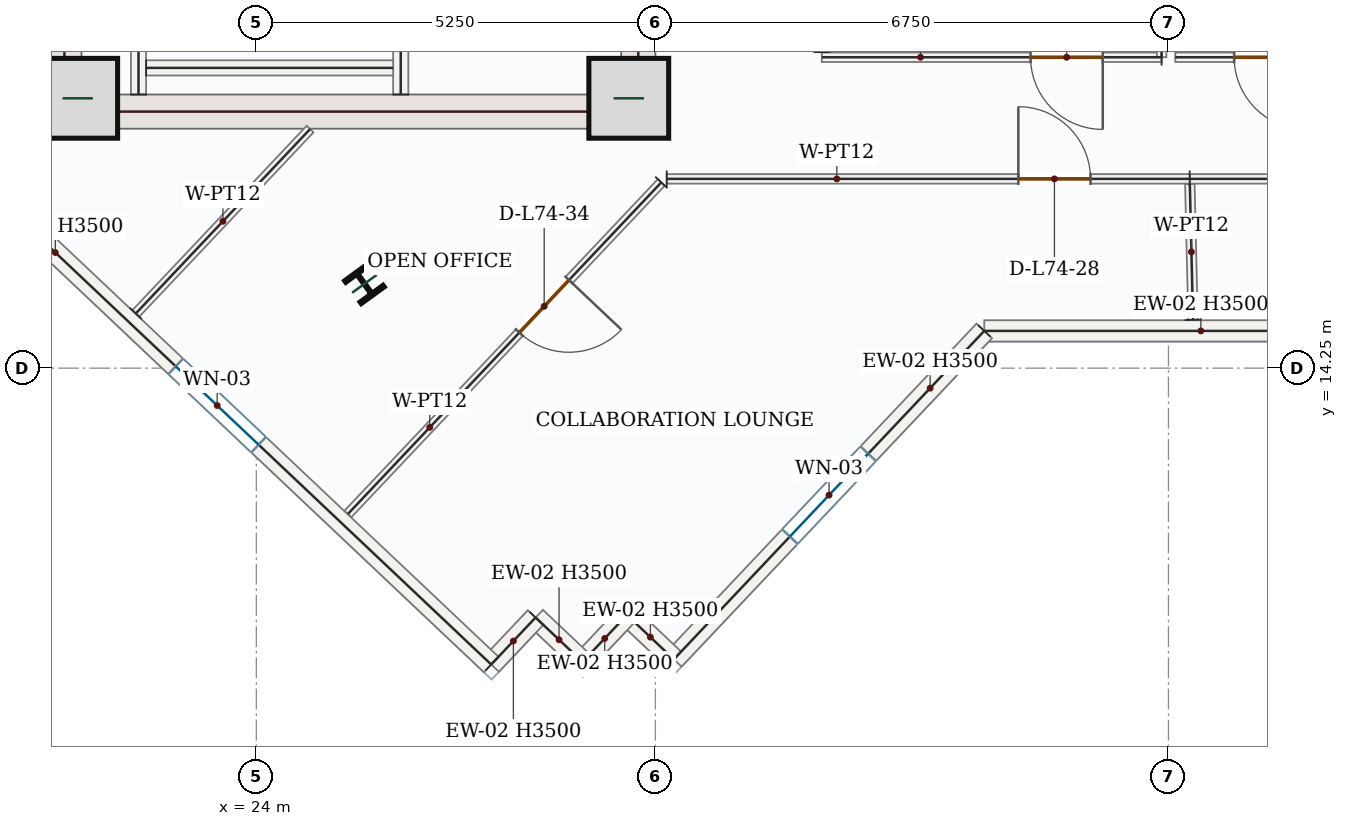
"""IFC4 building model, lengths in metres.
Left out: names, types, materials, properties, quantities, classifications, styles, units other than length and angle.
Written with IfcOpenShell. Run it as: python <this file> out.ifc"""

import sys

from ifc_helpers import new_model, si_unit, direction, frame, frame_2d, origin, origin_2d, place, context, subcontext, project, spatial, rectangle, i_section, extrude, source, transform, mapped, element, fill, save


model = new_model("IFC4")
c1 = context("Model", 3, precision=1e-05, world=origin(), true_north=direction((0.0, 1.0)))
c2 = subcontext(c1, "Body", "Model", "MODEL_VIEW")
j1 = project(units=[si_unit("LENGTHUNIT", "METRE"), si_unit("PLANEANGLEUNIT", "RADIAN")], contexts=[c1])
p1 = place(None, origin())
s1 = spatial("IfcSite", under=j1, at=p1, CompositionType="ELEMENT")
p2 = place(p1, origin())
s2 = spatial("IfcBuilding", under=s1, at=p2, CompositionType="ELEMENT")
p3 = place(p2, frame((0.0, 0.0, 306.6)))
s3 = spatial("IfcBuildingStorey", under=s2, at=p3, CompositionType="ELEMENT", Elevation=306.6)
m1 = source(origin(), c2, "Body", "SweptSolid", [
    extrude(rectangle(XDim=8.55, YDim=0.45, at=frame_2d((4.275, 0.0))), origin(), (0.0, 0.0, 1.0), 3.5),
])
p4 = place(p3, frame((21.475, 17.4, 0.0), z_axis=(0.0, 0.0, 1.0), x_axis=(0.0, 1.0, 0.0)))
e1 = element("IfcWall", 1, at=p4, inside=s3, PredefinedType="SHEAR", context=c2, shape_type="MappedRepresentation", body=[
    mapped(m1, transform((0.0, 0.0, 0.0), x_axis=(1.0, 0.0, 0.0), y_axis=(0.0, 1.0, 0.0), z_axis=(0.0, 0.0, 1.0), scale=1.0)),
])
p5 = place(p3, frame((29.025, 17.4, 0.0), z_axis=(0.0, 0.0, 1.0), x_axis=(0.0, 1.0, 0.0)))
e2 = element("IfcWall", 2, at=p5, inside=s3, PredefinedType="SHEAR", context=c2, shape_type="SweptSolid", body=[
    extrude(rectangle(XDim=8.55, YDim=0.45, at=frame_2d((4.275, 0.0))), origin(), (0.0, 0.0, 1.0), 3.5),
])
p6 = place(p5, frame((6.65, 0.0, 0.0)))
e3 = element("IfcOpeningElement", 3, at=p6, cuts=e2, PredefinedType="OPENING", context=c2, shape_type="SweptSolid", body=[
    extrude(rectangle(XDim=1.1, YDim=2.2, at=frame_2d((0.55, 1.1))), frame((0.0, 0.235, 0.0), z_axis=(0.0, -1.0, 0.0), x_axis=(1.0, 0.0, 0.0)), (0.0, 0.0, 1.0), 0.47),
])
p7 = place(p5, frame((2.7, 0.0, 0.0)))
e4 = element("IfcOpeningElement", 4, at=p7, cuts=e2, PredefinedType="OPENING", context=c2, shape_type="SweptSolid", body=[
    extrude(rectangle(XDim=0.88, YDim=2.1, at=frame_2d((0.44, 1.05))), frame((0.0, 0.235, 0.0), z_axis=(0.0, -1.0, 0.0), x_axis=(1.0, 0.0, 0.0)), (0.0, 0.0, 1.0), 0.47),
])
p8 = place(p5, frame((4.6, 0.0, 0.0)))
e5 = element("IfcOpeningElement", 5, at=p8, cuts=e2, PredefinedType="OPENING", context=c2, shape_type="SweptSolid", body=[
    extrude(rectangle(XDim=0.88, YDim=2.1, at=frame_2d((0.44, 1.05))), frame((0.0, 0.235, 0.0), z_axis=(0.0, -1.0, 0.0), x_axis=(1.0, 0.0, 0.0)), (0.0, 0.0, 1.0), 0.47),
])
m2 = source(origin(), c2, "Body", "SweptSolid", [
    extrude(rectangle(XDim=7.1, YDim=0.45, at=frame_2d((3.55, 0.0))), origin(), (0.0, 0.0, 1.0), 3.5),
])
p9 = place(p3, frame((21.7, 17.625, 0.0), z_axis=(0.0, 0.0, 1.0), x_axis=(1.0, 0.0, 0.0)))
e6 = element("IfcWall", 6, at=p9, inside=s3, PredefinedType="SHEAR", context=c2, shape_type="MappedRepresentation", body=[
    mapped(m2, transform((0.0, 0.0, 0.0), x_axis=(1.0, 0.0, 0.0), y_axis=(0.0, 1.0, 0.0), z_axis=(0.0, 0.0, 1.0), scale=1.0)),
])
m3 = source(origin(), c2, "Body", "SweptSolid", [
    extrude(rectangle(XDim=1.05, YDim=1.05, at=origin_2d()), origin(), (0.0, 0.0, 1.0), 3.75),
])
for number, where, z_axis, x_axis in (
    (7, (21.65, 17.8, 0.0), (0.0, 0.0, 1.0), (1.0, 0.0, 0.0)),
    (8, (28.9, 17.8, 0.0), (0.0, 0.0, 1.0), (1.0, 0.0, 0.0)),
):
    element("IfcColumn", number, at=place(p3, frame(where, z_axis=z_axis, x_axis=x_axis)), inside=s3, PredefinedType="COLUMN", context=c2, shape_type="MappedRepresentation", body=[
        mapped(m3, transform((0.0, 0.0, 0.0), x_axis=(1.0, 0.0, 0.0), y_axis=(0.0, 1.0, 0.0), z_axis=(0.0, 0.0, 1.0), scale=1.0)),
    ])
m4 = source(origin(), c2, "Body", "SweptSolid", [
    extrude(i_section(OverallWidth=0.374, OverallDepth=0.372, WebThickness=0.016, FlangeThickness=0.026, FilletRadius=0.018, at=origin_2d()), origin(), (0.0, 0.0, 1.0), 3.75),
])
p10 = place(p3, frame((25.422, 15.359, 0.0), z_axis=(0.0, 0.0, 1.0), x_axis=(0.809016994375, 0.587785252292, 0.0)))
e9 = element("IfcColumn", 9, at=p10, inside=s3, PredefinedType="COLUMN", context=c2, shape_type="MappedRepresentation", body=[
    mapped(m4, transform((0.0, 0.0, 0.0), x_axis=(1.0, 0.0, 0.0), y_axis=(0.0, 1.0, 0.0), z_axis=(0.0, 0.0, 1.0), scale=1.0)),
])
m5 = source(origin(), c2, "Body", "SweptSolid", [
    extrude(rectangle(XDim=5.699, YDim=0.28, at=frame_2d((2.85, 0.0))), origin(), (0.0, 0.0, 1.0), 3.5),
])
p11 = place(p3, frame((39.276, 14.74, 0.0), z_axis=(0.0, 0.0, 1.0), x_axis=(-1.0, 0.0, 0.0)))
e10 = element("IfcWall", 10, at=p11, inside=s3, PredefinedType="SOLIDWALL", context=c2, shape_type="MappedRepresentation", body=[
    mapped(m5, transform((0.0, 0.0, 0.0), x_axis=(1.0, 0.0, 0.0), y_axis=(0.0, 1.0, 0.0), z_axis=(0.0, 0.0, 1.0), scale=1.0)),
])
p12 = place(p3, frame((33.577, 14.74, 0.0), z_axis=(0.0, 0.0, 1.0), x_axis=(-0.686888766374, -0.72676256276, 0.0)))
e11 = element("IfcWall", 11, at=p12, inside=s3, PredefinedType="SOLIDWALL", context=c2, shape_type="SweptSolid", body=[
    extrude(rectangle(XDim=5.945, YDim=0.28, at=frame_2d((2.973, 0.0))), origin(), (0.0, 0.0, 1.0), 3.5),
])
p13 = place(p12, frame((2.223, 0.0, 0.85)))
e12 = element("IfcOpeningElement", 12, at=p13, cuts=e11, PredefinedType="OPENING", context=c2, shape_type="SweptSolid", body=[
    extrude(rectangle(XDim=1.5, YDim=1.5, at=frame_2d((0.75, 0.75))), frame((0.0, 0.15, 0.0), z_axis=(0.0, -1.0, 0.0), x_axis=(1.0, 0.0, 0.0)), (0.0, 0.0, 1.0), 0.3),
])
m6 = source(origin(), c2, "Body", "SweptSolid", [
    extrude(rectangle(XDim=0.85, YDim=0.28, at=frame_2d((0.425, 0.0))), origin(), (0.0, 0.0, 1.0), 3.5),
])
p14 = place(p3, frame((29.493, 10.419, 0.0), z_axis=(0.0, 0.0, 1.0), x_axis=(-0.726790047388, 0.686859685101, 0.0)))
e13 = element("IfcWall", 13, at=p14, inside=s3, PredefinedType="SOLIDWALL", context=c2, shape_type="MappedRepresentation", body=[
    mapped(m6, transform((0.0, 0.0, 0.0), x_axis=(1.0, 0.0, 0.0), y_axis=(0.0, 1.0, 0.0), z_axis=(0.0, 0.0, 1.0), scale=1.0)),
])
m7 = source(origin(), c2, "Body", "SweptSolid", [
    extrude(rectangle(XDim=0.85, YDim=0.28, at=frame_2d((0.425, 0.0))), origin(), (0.0, 0.0, 1.0), 3.5),
])
p15 = place(p3, frame((28.875, 11.003, 0.0), z_axis=(0.0, 0.0, 1.0), x_axis=(-0.687011382404, -0.726646654466, 0.0)))
e14 = element("IfcWall", 14, at=p15, inside=s3, PredefinedType="SOLIDWALL", context=c2, shape_type="MappedRepresentation", body=[
    mapped(m7, transform((0.0, 0.0, 0.0), x_axis=(1.0, 0.0, 0.0), y_axis=(0.0, 1.0, 0.0), z_axis=(0.0, 0.0, 1.0), scale=1.0)),
])
p16 = place(p3, frame((28.292, 10.385, 0.0), z_axis=(0.0, 0.0, 1.0), x_axis=(-0.726790047388, 0.686859685101, 0.0)))
e15 = element("IfcWall", 15, at=p16, inside=s3, PredefinedType="SOLIDWALL", context=c2, shape_type="MappedRepresentation", body=[
    mapped(m6, transform((0.0, 0.0, 0.0), x_axis=(1.0, 0.0, 0.0), y_axis=(0.0, 1.0, 0.0), z_axis=(0.0, 0.0, 1.0), scale=1.0)),
])
p17 = place(p3, frame((27.674, 10.969, 0.0), z_axis=(0.0, 0.0, 1.0), x_axis=(-0.687011382404, -0.726646654466, 0.0)))
e16 = element("IfcWall", 16, at=p17, inside=s3, PredefinedType="SOLIDWALL", context=c2, shape_type="MappedRepresentation", body=[
    mapped(m7, transform((0.0, 0.0, 0.0), x_axis=(1.0, 0.0, 0.0), y_axis=(0.0, 1.0, 0.0), z_axis=(0.0, 0.0, 1.0), scale=1.0)),
])
p18 = place(p3, frame((27.09, 10.351, 0.0), z_axis=(0.0, 0.0, 1.0), x_axis=(-0.726772856404, 0.686877875022, 0.0)))
e17 = element("IfcWall", 17, at=p18, inside=s3, PredefinedType="SOLIDWALL", context=c2, shape_type="SweptSolid", body=[
    extrude(rectangle(XDim=9.92, YDim=0.28, at=frame_2d((4.96, 0.0))), origin(), (0.0, 0.0, 1.0), 3.5),
])
p19 = place(p18, frame((4.21, 0.0, 0.85)))
e18 = element("IfcOpeningElement", 18, at=p19, cuts=e17, PredefinedType="OPENING", context=c2, shape_type="SweptSolid", body=[
    extrude(rectangle(XDim=1.5, YDim=1.5, at=frame_2d((0.75, 0.75))), frame((0.0, 0.15, 0.0), z_axis=(0.0, -1.0, 0.0), x_axis=(1.0, 0.0, 0.0)), (0.0, 0.0, 1.0), 0.3),
])
m8 = source(origin(), c2, "Body", "SweptSolid", [
    extrude(rectangle(XDim=7.87, YDim=0.2, at=frame_2d((3.935, 0.0))), origin(), (0.0, 0.0, 1.0), 3.5),
])
p20 = place(p3, frame((22.45, 17.85, 0.0), z_axis=(0.0, 0.0, 1.0), x_axis=(0.0, 1.0, 0.0)))
e19 = element("IfcWall", 19, at=p20, inside=s3, PredefinedType="SOLIDWALL", context=c2, shape_type="MappedRepresentation", body=[
    mapped(m8, transform((0.0, 0.0, 0.0), x_axis=(1.0, 0.0, 0.0), y_axis=(0.0, 1.0, 0.0), z_axis=(0.0, 0.0, 1.0), scale=1.0)),
])
p21 = place(p3, frame((25.9, 17.85, 0.0), z_axis=(0.0, 0.0, 1.0), x_axis=(0.0, 1.0, 0.0)))
e20 = element("IfcWall", 20, at=p21, inside=s3, PredefinedType="SOLIDWALL", context=c2, shape_type="SweptSolid", body=[
    extrude(rectangle(XDim=8.0, YDim=0.2, at=frame_2d((4.0, 0.0))), origin(), (0.0, 0.0, 1.0), 3.5),
])
p22 = place(p21, frame((6.2, 0.0, 0.0)))
e21 = element("IfcOpeningElement", 21, at=p22, cuts=e20, PredefinedType="OPENING", context=c2, shape_type="SweptSolid", body=[
    extrude(rectangle(XDim=1.0, YDim=2.15, at=frame_2d((0.5, 1.075))), frame((0.0, 0.11, 0.0), z_axis=(0.0, -1.0, 0.0), x_axis=(1.0, 0.0, 0.0)), (0.0, 0.0, 1.0), 0.22),
])
p23 = place(p21, frame((0.6, 0.0, 0.0)))
e22 = element("IfcOpeningElement", 22, at=p23, cuts=e20, PredefinedType="OPENING", context=c2, shape_type="SweptSolid", body=[
    extrude(rectangle(XDim=0.88, YDim=2.1, at=frame_2d((0.44, 1.05))), frame((0.0, 0.11, 0.0), z_axis=(0.0, -1.0, 0.0), x_axis=(1.0, 0.0, 0.0)), (0.0, 0.0, 1.0), 0.22),
])
m9 = source(origin(), c2, "Body", "SweptSolid", [
    extrude(rectangle(XDim=3.25, YDim=0.2, at=frame_2d((1.625, 0.0))), origin(), (0.0, 0.0, 1.0), 3.5),
])
p24 = place(p3, frame((22.55, 18.2, 0.0), z_axis=(0.0, 0.0, 1.0), x_axis=(1.0, 0.0, 0.0)))
e23 = element("IfcWall", 23, at=p24, inside=s3, PredefinedType="SOLIDWALL", context=c2, shape_type="MappedRepresentation", body=[
    mapped(m9, transform((0.0, 0.0, 0.0), x_axis=(1.0, 0.0, 0.0), y_axis=(0.0, 1.0, 0.0), z_axis=(0.0, 0.0, 1.0), scale=1.0)),
])
p25 = place(p3, frame((35.91, 18.34, 0.0), z_axis=(0.0, 0.0, 1.0), x_axis=(-1.0, 0.0, 0.0)))
e24 = element("IfcWall", 24, at=p25, inside=s3, PredefinedType="PARTITIONING", context=c2, shape_type="SweptSolid", body=[
    extrude(rectangle(XDim=4.47, YDim=0.125, at=frame_2d((2.235, 0.0))), origin(), (0.0, 0.0, 1.0), 3.5),
])
p26 = place(p25, frame((0.774, 0.0, 0.0)))
e25 = element("IfcOpeningElement", 25, at=p26, cuts=e24, PredefinedType="OPENING", context=c2, shape_type="SweptSolid", body=[
    extrude(rectangle(XDim=0.95, YDim=2.15, at=frame_2d((0.475, 1.075))), frame((0.0, 0.073, 0.0), z_axis=(0.0, -1.0, 0.0), x_axis=(1.0, 0.0, 0.0)), (0.0, 0.0, 1.0), 0.145),
])
m10 = source(origin(), c2, "Body", "SweptSolid", [
    extrude(rectangle(XDim=3.67, YDim=0.125, at=frame_2d((1.835, 0.0))), origin(), (0.0, 0.0, 1.0), 3.5),
])
p27 = place(p3, frame((35.91, 22.01, 0.0), z_axis=(0.0, 0.0, 1.0), x_axis=(0.0, -1.0, 0.0)))
e26 = element("IfcWall", 26, at=p27, inside=s3, PredefinedType="PARTITIONING", context=c2, shape_type="MappedRepresentation", body=[
    mapped(m10, transform((0.0, 0.0, 0.0), x_axis=(1.0, 0.0, 0.0), y_axis=(0.0, 1.0, 0.0), z_axis=(0.0, 0.0, 1.0), scale=1.0)),
])
p28 = place(p3, frame((40.56, 18.34, 0.0), z_axis=(0.0, 0.0, 1.0), x_axis=(-1.0, 0.0, 0.0)))
e27 = element("IfcWall", 27, at=p28, inside=s3, PredefinedType="PARTITIONING", context=c2, shape_type="SweptSolid", body=[
    extrude(rectangle(XDim=4.47, YDim=0.125, at=frame_2d((2.235, 0.0))), origin(), (0.0, 0.0, 1.0), 3.5),
])
p29 = place(p28, frame((2.746, 0.0, 0.0)))
e28 = element("IfcOpeningElement", 28, at=p29, cuts=e27, PredefinedType="OPENING", context=c2, shape_type="SweptSolid", body=[
    extrude(rectangle(XDim=0.95, YDim=2.15, at=frame_2d((0.475, 1.075))), frame((0.0, 0.073, 0.0), z_axis=(0.0, -1.0, 0.0), x_axis=(1.0, 0.0, 0.0)), (0.0, 0.0, 1.0), 0.145),
])
m11 = source(origin(), c2, "Body", "SweptSolid", [
    extrude(rectangle(XDim=3.337, YDim=0.125, at=frame_2d((1.669, 0.0))), origin(), (0.0, 0.0, 1.0), 3.5),
])
p30 = place(p3, frame((22.415, 14.969, 0.0), z_axis=(0.0, 0.0, 1.0), x_axis=(0.686891986515, 0.726759519278, 0.0)))
e29 = element("IfcWall", 29, at=p30, inside=s3, PredefinedType="PARTITIONING", context=c2, shape_type="MappedRepresentation", body=[
    mapped(m11, transform((0.0, 0.0, 0.0), x_axis=(1.0, 0.0, 0.0), y_axis=(0.0, 1.0, 0.0), z_axis=(0.0, 0.0, 1.0), scale=1.0)),
])
p31 = place(p3, frame((29.328, 16.694, 0.0), z_axis=(0.0, 0.0, 1.0), x_axis=(-0.686871949206, -0.726778456886, 0.0)))
e30 = element("IfcWall", 30, at=p31, inside=s3, PredefinedType="PARTITIONING", context=c2, shape_type="SweptSolid", body=[
    extrude(rectangle(XDim=6.001, YDim=0.125, at=frame_2d((3.001, 0.0))), origin(), (0.0, 0.0, 1.0), 3.5),
])
p32 = place(p31, frame((1.768, 0.0, 0.0)))
e31 = element("IfcOpeningElement", 31, at=p32, cuts=e30, PredefinedType="OPENING", context=c2, shape_type="SweptSolid", body=[
    extrude(rectangle(XDim=0.95, YDim=2.15, at=frame_2d((0.475, 1.075))), frame((0.0, 0.073, 0.0), z_axis=(0.0, -1.0, 0.0), x_axis=(1.0, 0.0, 0.0)), (0.0, 0.0, 1.0), 0.145),
])
p33 = place(p3, frame((36.28, 16.74, 0.0), z_axis=(0.0, 0.0, 1.0), x_axis=(1.0, 0.0, 0.0)))
e32 = element("IfcWall", 32, at=p33, inside=s3, PredefinedType="PARTITIONING", context=c2, shape_type="SweptSolid", body=[
    extrude(rectangle(XDim=6.464, YDim=0.125, at=frame_2d((3.232, 0.0))), origin(), (0.0, 0.0, 1.0), 3.5),
])
p34 = place(p33, frame((1.213, 0.0, 0.0)))
e33 = element("IfcOpeningElement", 33, at=p34, cuts=e32, PredefinedType="OPENING", context=c2, shape_type="SweptSolid", body=[
    extrude(rectangle(XDim=0.95, YDim=2.15, at=frame_2d((0.475, 1.075))), frame((0.0, 0.073, 0.0), z_axis=(0.0, -1.0, 0.0), x_axis=(1.0, 0.0, 0.0)), (0.0, 0.0, 1.0), 0.145),
])
m12 = source(origin(), c2, "Body", "SweptSolid", [
    extrude(rectangle(XDim=1.788, YDim=0.125, at=frame_2d((0.894, 0.0))), origin(), (0.0, 0.0, 1.0), 3.5),
])
p35 = place(p3, frame((36.323, 14.885, 0.0), z_axis=(0.0, 0.0, 1.0), x_axis=(-0.023484370815, 0.999724204132, 0.0)))
e34 = element("IfcWall", 34, at=p35, inside=s3, PredefinedType="PARTITIONING", context=c2, shape_type="MappedRepresentation", body=[
    mapped(m12, transform((0.0, 0.0, 0.0), x_axis=(1.0, 0.0, 0.0), y_axis=(0.0, 1.0, 0.0), z_axis=(0.0, 0.0, 1.0), scale=1.0)),
])
p36 = place(p3, frame((29.399, 16.74, 0.0), z_axis=(0.0, 0.0, 1.0), x_axis=(1.0, 0.0, 0.0)))
e35 = element("IfcWall", 35, at=p36, inside=s3, PredefinedType="PARTITIONING", context=c2, shape_type="SweptSolid", body=[
    extrude(rectangle(XDim=6.881, YDim=0.125, at=frame_2d((3.44, 0.0))), origin(), (0.0, 0.0, 1.0), 3.5),
])
p37 = place(p36, frame((4.626, 0.0, 0.0)))
e36 = element("IfcOpeningElement", 36, at=p37, cuts=e35, PredefinedType="OPENING", context=c2, shape_type="SweptSolid", body=[
    extrude(rectangle(XDim=0.95, YDim=2.15, at=frame_2d((0.475, 1.075))), frame((0.0, 0.073, 0.0), z_axis=(0.0, -1.0, 0.0), x_axis=(1.0, 0.0, 0.0)), (0.0, 0.0, 1.0), 0.145),
])
m13 = source(origin(), c2, "Body", "SweptSolid", [
    extrude(rectangle(XDim=1.5, YDim=1.5, at=frame_2d((0.75, 0.75))), frame((0.0, 0.03, 0.0), z_axis=(0.0, -1.0, 0.0), x_axis=(1.0, 0.0, 0.0)), (0.0, 0.0, 1.0), 0.06),
])
p38 = place(p13, origin())
e37 = element("IfcWindow", 37, at=p38, inside=s3, PartitioningType="SINGLE_PANEL", PredefinedType="WINDOW", context=c2, shape_type="MappedRepresentation", body=[
    mapped(m13, transform((0.0, 0.0, 0.0), x_axis=(1.0, 0.0, 0.0), y_axis=(0.0, 1.0, 0.0), z_axis=(0.0, 0.0, 1.0), scale=1.0)),
])
fill(e12, e37)
p39 = place(p19, origin())
e38 = element("IfcWindow", 38, at=p39, inside=s3, PartitioningType="SINGLE_PANEL", PredefinedType="WINDOW", context=c2, shape_type="MappedRepresentation", body=[
    mapped(m13, transform((0.0, 0.0, 0.0), x_axis=(1.0, 0.0, 0.0), y_axis=(0.0, 1.0, 0.0), z_axis=(0.0, 0.0, 1.0), scale=1.0)),
])
fill(e18, e38)
m14 = source(origin(), c2, "Body", "SweptSolid", [
    extrude(rectangle(XDim=0.95, YDim=2.15, at=frame_2d((0.475, 1.075))), frame((0.0, 0.025, 0.0), z_axis=(0.0, -1.0, 0.0), x_axis=(1.0, 0.0, 0.0)), (0.0, 0.0, 1.0), 0.05),
])
p40 = place(p26, origin())
e39 = element("IfcDoor", 39, at=p40, inside=s3, OperationType="SINGLE_SWING_LEFT", PredefinedType="DOOR", context=c2, shape_type="MappedRepresentation", body=[
    mapped(m14, transform((0.0, 0.0, 0.0), x_axis=(1.0, 0.0, 0.0), y_axis=(0.0, 1.0, 0.0), z_axis=(0.0, 0.0, 1.0), scale=1.0)),
])
fill(e25, e39)
p41 = place(p29, origin())
e40 = element("IfcDoor", 40, at=p41, inside=s3, OperationType="SINGLE_SWING_LEFT", PredefinedType="DOOR", context=c2, shape_type="MappedRepresentation", body=[
    mapped(m14, transform((0.0, 0.0, 0.0), x_axis=(1.0, 0.0, 0.0), y_axis=(0.0, 1.0, 0.0), z_axis=(0.0, 0.0, 1.0), scale=1.0)),
])
fill(e28, e40)
p42 = place(p37, origin())
e41 = element("IfcDoor", 41, at=p42, inside=s3, OperationType="SINGLE_SWING_LEFT", PredefinedType="DOOR", context=c2, shape_type="MappedRepresentation", body=[
    mapped(m14, transform((0.0, 0.0, 0.0), x_axis=(1.0, 0.0, 0.0), y_axis=(0.0, 1.0, 0.0), z_axis=(0.0, 0.0, 1.0), scale=1.0)),
])
fill(e36, e41)
p43 = place(p32, origin())
e42 = element("IfcDoor", 42, at=p43, inside=s3, OperationType="SINGLE_SWING_LEFT", PredefinedType="DOOR", context=c2, shape_type="MappedRepresentation", body=[
    mapped(m14, transform((0.0, 0.0, 0.0), x_axis=(1.0, 0.0, 0.0), y_axis=(0.0, 1.0, 0.0), z_axis=(0.0, 0.0, 1.0), scale=1.0)),
])
fill(e31, e42)
save(model, sys.argv[1])
